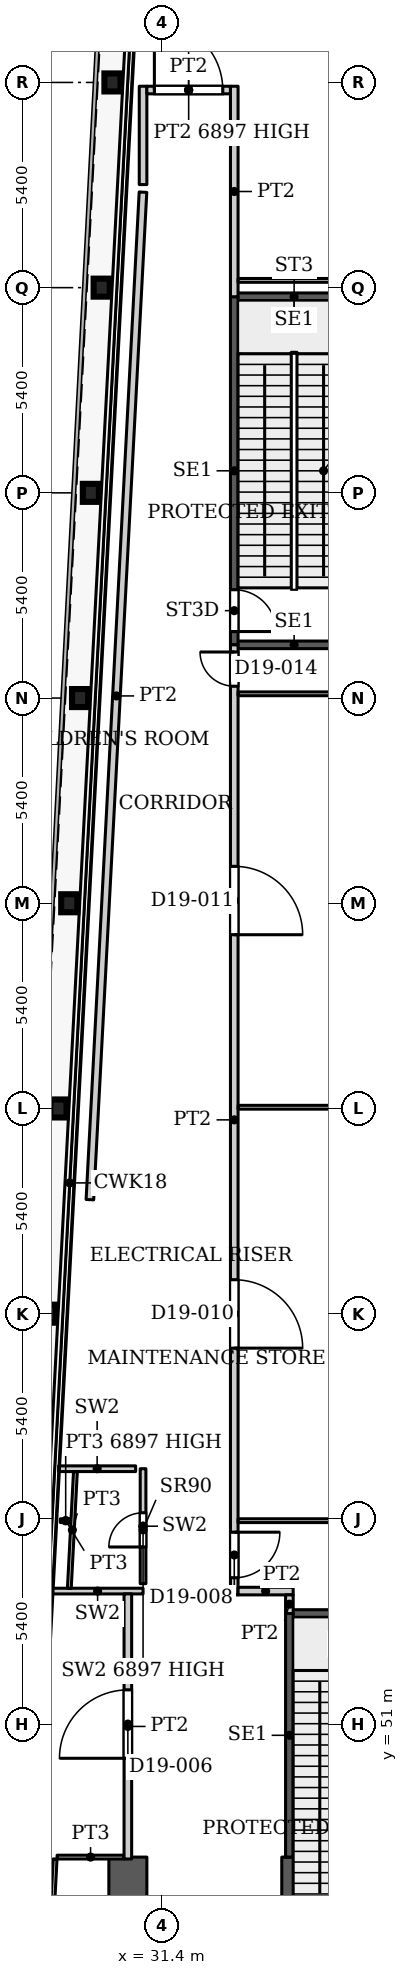
"""IFC4 building model, lengths in metres.
Left out: names, types, materials, properties, quantities, classifications, styles, units other than length and angle.
Written with IfcOpenShell. Run it as: python <this file> out.ifc"""

import sys

from ifc_helpers import new_model, si_unit, direction, frame, frame_2d, origin, origin_2d, place, context, subcontext, project, spatial, rectangle, i_section, extrude, source, transform, mapped, element, fill, save


model = new_model("IFC4")
c1 = context("Model", 3, precision=1e-05, world=origin(), true_north=direction((0.0, 1.0)))
c2 = subcontext(c1, "Body", "Model", "MODEL_VIEW")
j1 = project(units=[si_unit("LENGTHUNIT", "METRE"), si_unit("PLANEANGLEUNIT", "RADIAN")], contexts=[c1])
p1 = place(None, origin())
s1 = spatial("IfcSite", under=j1, at=p1, CompositionType="ELEMENT")
p2 = place(p1, origin())
s2 = spatial("IfcBuilding", under=s1, at=p2, CompositionType="ELEMENT")
p3 = place(p2, frame((0.0, 0.0, 81.2)))
s3 = spatial("IfcBuildingStorey", under=s2, at=p3, CompositionType="ELEMENT", Elevation=81.2)
for number, where, z_axis, x_axis in (
    (1, (28.39, 61.8, 0.0), (0.0, 0.0, 1.0), (1.0, 0.0, 0.0)),
    (2, (28.674, 67.2, 0.0), (0.0, 0.0, 1.0), (1.0, 0.0, 0.0)),
    (3, (28.958, 72.6, 0.0), (0.0, 0.0, 1.0), (1.0, 0.0, 0.0)),
    (4, (29.243, 78.0, 0.0), (0.0, 0.0, 1.0), (1.0, 0.0, 0.0)),
    (5, (29.527, 83.4, 0.0), (0.0, 0.0, 1.0), (1.0, 0.0, 0.0)),
    (6, (29.811, 88.8, 0.0), (0.0, 0.0, 1.0), (1.0, 0.0, 0.0)),
    (7, (30.095, 94.2, 0.0), (0.0, 0.0, 1.0), (1.0, 0.0, 0.0)),
):
    element("IfcColumn", number, at=place(p3, frame(where, z_axis=z_axis, x_axis=x_axis)), inside=s3, PredefinedType="COLUMN", context=c2, shape_type="SweptSolid", body=[
        extrude(i_section(OverallWidth=0.424, OverallDepth=0.474, WebThickness=0.048, FlangeThickness=0.077, FilletRadius=0.014, at=origin_2d()), origin(), (0.0, 0.0, 1.0), 7.8),
    ])
p4 = place(p3, frame((34.75, 29.05, 0.0), z_axis=(0.0, 0.0, 1.0), x_axis=(0.0, 1.0, 0.0)))
e8 = element("IfcWall", 8, at=p4, inside=s3, PredefinedType="SHEAR", context=c2, shape_type="SweptSolid", body=[
    extrude(rectangle(XDim=18.45, YDim=0.4, at=frame_2d((9.225, 0.0))), origin(), (0.0, 0.0, 1.0), 7.8),
])
p5 = place(p4, frame((8.025, 0.0, 0.0)))
e9 = element("IfcOpeningElement", 9, at=p5, cuts=e8, PredefinedType="OPENING", context=c2, shape_type="SweptSolid", body=[
    extrude(rectangle(XDim=1.1, YDim=2.2, at=frame_2d((0.55, 1.1))), frame((0.0, 0.21, 0.0), z_axis=(0.0, -1.0, 0.0), x_axis=(1.0, 0.0, 0.0)), (0.0, 0.0, 1.0), 0.42),
])
p6 = place(p4, frame((10.875, 0.0, 0.0)))
e10 = element("IfcOpeningElement", 10, at=p6, cuts=e8, PredefinedType="OPENING", context=c2, shape_type="SweptSolid", body=[
    extrude(rectangle(XDim=1.1, YDim=2.2, at=frame_2d((0.55, 1.1))), frame((0.0, 0.21, 0.0), z_axis=(0.0, -1.0, 0.0), x_axis=(1.0, 0.0, 0.0)), (0.0, 0.0, 1.0), 0.42),
])
p7 = place(p4, frame((13.725, 0.0, 0.0)))
e11 = element("IfcOpeningElement", 11, at=p7, cuts=e8, PredefinedType="OPENING", context=c2, shape_type="SweptSolid", body=[
    extrude(rectangle(XDim=1.1, YDim=2.2, at=frame_2d((0.55, 1.1))), frame((0.0, 0.21, 0.0), z_axis=(0.0, -1.0, 0.0), x_axis=(1.0, 0.0, 0.0)), (0.0, 0.0, 1.0), 0.42),
])
p8 = place(p4, frame((15.95, 0.0, 0.0)))
e12 = element("IfcOpeningElement", 12, at=p8, cuts=e8, PredefinedType="OPENING", context=c2, shape_type="SweptSolid", body=[
    extrude(rectangle(XDim=1.1, YDim=2.2, at=frame_2d((0.55, 1.1))), frame((0.0, 0.21, 0.0), z_axis=(0.0, -1.0, 0.0), x_axis=(1.0, 0.0, 0.0)), (0.0, 0.0, 1.0), 0.42),
])
p9 = place(p3, frame((30.5, 29.05, 0.0), z_axis=(0.0, 0.0, 1.0), x_axis=(0.0, 1.0, 0.0)))
e13 = element("IfcWall", 13, at=p9, inside=s3, PredefinedType="SHEAR", context=c2, shape_type="SweptSolid", body=[
    extrude(rectangle(XDim=18.45, YDim=1.0, at=frame_2d((9.225, 0.0))), origin(), (0.0, 0.0, 1.0), 7.8),
])
p10 = place(p9, frame((1.5, 0.0, 0.0)))
e14 = element("IfcOpeningElement", 14, at=p10, cuts=e13, PredefinedType="OPENING", context=c2, shape_type="SweptSolid", body=[
    extrude(rectangle(XDim=0.9, YDim=2.2, at=frame_2d((0.45, 1.1))), frame((0.0, 0.51, 0.0), z_axis=(0.0, -1.0, 0.0), x_axis=(1.0, 0.0, 0.0)), (0.0, 0.0, 1.0), 1.02),
])
p11 = place(p9, frame((8.146, 0.0, 0.0)))
e15 = element("IfcOpeningElement", 15, at=p11, cuts=e13, PredefinedType="OPENING", context=c2, shape_type="SweptSolid", body=[
    extrude(rectangle(XDim=0.9, YDim=2.2, at=frame_2d((0.45, 1.1))), frame((0.0, 0.51, 0.0), z_axis=(0.0, -1.0, 0.0), x_axis=(1.0, 0.0, 0.0)), (0.0, 0.0, 1.0), 1.02),
])
p12 = place(p3, frame((34.75, 53.91, 0.0), z_axis=(0.0, 0.0, 1.0), x_axis=(1.0, 0.0, 0.0)))
e16 = element("IfcWall", 16, at=p12, inside=s3, PredefinedType="SHEAR", context=c2, shape_type="SweptSolid", body=[
    extrude(rectangle(XDim=3.15, YDim=0.2, at=frame_2d((1.575, 0.0))), origin(), (0.0, 0.0, 1.0), 7.8),
])
p13 = place(p3, frame((34.75, 47.5, 0.0), z_axis=(0.0, 0.0, 1.0), x_axis=(0.0, 1.0, 0.0)))
e17 = element("IfcWall", 17, at=p13, inside=s3, PredefinedType="SHEAR", context=c2, shape_type="SweptSolid", body=[
    extrude(rectangle(XDim=6.41, YDim=0.2, at=frame_2d((3.205, 0.0))), origin(), (0.0, 0.0, 1.0), 7.8),
])
for number, where, z_axis, x_axis in (
    (18, (33.3, 79.4, 0.0), (0.0, 0.0, 1.0), (1.0, 0.0, 0.0)),
    (19, (33.3, 88.56, 0.0), (0.0, 0.0, 1.0), (1.0, 0.0, 0.0)),
):
    element("IfcWall", number, at=place(p3, frame(where, z_axis=z_axis, x_axis=x_axis)), inside=s3, PredefinedType="SHEAR", context=c2, shape_type="SweptSolid", body=[
        extrude(rectangle(XDim=3.15, YDim=0.2, at=frame_2d((1.575, 0.0))), origin(), (0.0, 0.0, 1.0), 7.8),
    ])
p14 = place(p3, frame((33.3, 79.4, 0.0), z_axis=(0.0, 0.0, 1.0), x_axis=(0.0, 1.0, 0.0)))
e20 = element("IfcWall", 20, at=p14, inside=s3, PredefinedType="SHEAR", context=c2, shape_type="SweptSolid", body=[
    extrude(rectangle(XDim=9.16, YDim=0.2, at=frame_2d((4.58, 0.0))), origin(), (0.0, 0.0, 1.0), 7.8),
])
p15 = place(p14, frame((0.35, 0.0, 0.0)))
e21 = element("IfcOpeningElement", 21, at=p15, cuts=e20, PredefinedType="OPENING", context=c2, shape_type="SweptSolid", body=[
    extrude(rectangle(XDim=1.1, YDim=2.2, at=frame_2d((0.55, 1.1))), frame((0.0, 0.11, 0.0), z_axis=(0.0, -1.0, 0.0), x_axis=(1.0, 0.0, 0.0)), (0.0, 0.0, 1.0), 0.22),
])
p16 = place(p3, frame((28.508, 54.5, 0.0), z_axis=(0.0, 0.0, 1.0), x_axis=(1.0, 0.0, 0.0)))
e22 = element("IfcWall", 22, at=p16, inside=s3, PredefinedType="PARTITIONING", context=c2, shape_type="SweptSolid", body=[
    extrude(rectangle(XDim=2.392, YDim=0.15, at=frame_2d((1.196, 0.0))), origin(), (0.0, 0.0, 1.0), 7.8),
])
p17 = place(p3, frame((30.9, 54.695, 0.0), z_axis=(0.0, 0.0, 1.0), x_axis=(0.0, 1.0, 0.0)))
e23 = element("IfcWall", 23, at=p17, inside=s3, PredefinedType="PARTITIONING", context=c2, shape_type="SweptSolid", body=[
    extrude(rectangle(XDim=3.025, YDim=0.15, at=frame_2d((1.512, 0.0))), origin(), (0.0, 0.0, 1.0), 6.897),
])
p18 = place(p17, frame((0.965, 0.0, 0.0)))
e24 = element("IfcOpeningElement", 24, at=p18, cuts=e23, PredefinedType="OPENING", context=c2, shape_type="SweptSolid", body=[
    extrude(rectangle(XDim=0.9, YDim=2.2, at=frame_2d((0.45, 1.1))), frame((0.0, 0.085, 0.0), z_axis=(0.0, -1.0, 0.0), x_axis=(1.0, 0.0, 0.0)), (0.0, 0.0, 1.0), 0.17),
])
p19 = place(p3, frame((28.678, 57.72, 0.0), z_axis=(0.0, 0.0, 1.0), x_axis=(1.0, 0.0, 0.0)))
e25 = element("IfcWall", 25, at=p19, inside=s3, PredefinedType="PARTITIONING", context=c2, shape_type="SweptSolid", body=[
    extrude(rectangle(XDim=2.027, YDim=0.15, at=frame_2d((1.014, 0.0))), origin(), (0.0, 0.0, 1.0), 7.8),
])
p20 = place(p3, frame((28.264, 41.32, 0.0), z_axis=(0.0, 0.0, 1.0), x_axis=(0.052460718565, 0.998622988423, 0.0)))
e26 = element("IfcWall", 26, at=p20, inside=s3, PredefinedType="PARTITIONING", context=c2, shape_type="SweptSolid", body=[
    extrude(rectangle(XDim=6.138, YDim=0.1, at=frame_2d((3.069, 0.0))), origin(), (0.0, 0.0, 1.0), 7.5),
])
p21 = place(p3, frame((28.638, 47.5, 0.0), z_axis=(0.0, 0.0, 1.0), x_axis=(1.0, 0.0, 0.0)))
e27 = element("IfcWall", 27, at=p21, inside=s3, PredefinedType="PARTITIONING", context=c2, shape_type="SweptSolid", body=[
    extrude(rectangle(XDim=1.762, YDim=0.1, at=frame_2d((0.881, 0.0))), origin(), (0.0, 0.0, 1.0), 7.5),
])
p22 = place(p3, frame((28.724, 56.353, 0.0), z_axis=(0.0, 0.0, 1.0), x_axis=(1.0, 0.0, 0.0)))
e28 = element("IfcWall", 28, at=p22, inside=s3, PredefinedType="PARTITIONING", context=c2, shape_type="SweptSolid", body=[
    extrude(rectangle(XDim=0.28, YDim=0.1, at=frame_2d((0.14, 0.0))), origin(), (0.0, 0.0, 1.0), 6.897),
])
p23 = place(p3, frame((28.96, 54.574, 0.0), z_axis=(0.0, 0.0, 1.0), x_axis=(0.052145785312, 0.998639483034, 0.0)))
e29 = element("IfcWall", 29, at=p23, inside=s3, PredefinedType="PARTITIONING", context=c2, shape_type="SweptSolid", body=[
    extrude(rectangle(XDim=3.071, YDim=0.1, at=frame_2d((1.536, 0.0))), origin(), (0.0, 0.0, 1.0), 7.5),
])
p24 = place(p3, frame((29.501, 64.8, 0.0), z_axis=(0.0, 0.0, 1.0), x_axis=(0.052619165502, 0.998614652117, 0.0)))
e30 = element("IfcWall", 30, at=p24, inside=s3, PredefinedType="PARTITIONING", context=c2, shape_type="SweptSolid", body=[
    extrude(rectangle(XDim=26.549, YDim=0.2, at=frame_2d((13.274, 0.0))), origin(), (0.0, 0.0, 1.0), 7.5),
])
p25 = place(p3, frame((30.5, 47.45, 0.0), z_axis=(0.0, 0.0, 1.0), x_axis=(0.0, 1.0, 0.0)))
e31 = element("IfcWall", 31, at=p25, inside=s3, PredefinedType="PARTITIONING", context=c2, shape_type="SweptSolid", body=[
    extrude(rectangle(XDim=6.976, YDim=0.2, at=frame_2d((3.488, 0.0))), origin(), (0.0, 0.0, 1.0), 7.5),
])
p26 = place(p25, frame((2.65, 0.0, 0.0)))
e32 = element("IfcOpeningElement", 32, at=p26, cuts=e31, PredefinedType="OPENING", context=c2, shape_type="SweptSolid", body=[
    extrude(rectangle(XDim=1.8, YDim=2.1, at=frame_2d((0.9, 1.05))), frame((0.0, 0.11, 0.0), z_axis=(0.0, -1.0, 0.0), x_axis=(1.0, 0.0, 0.0)), (0.0, 0.0, 1.0), 0.22),
])
p27 = place(p3, frame((30.9, 91.512, 0.0), z_axis=(0.0, 0.0, 1.0), x_axis=(0.0, 1.0, 0.0)))
e33 = element("IfcWall", 33, at=p27, inside=s3, PredefinedType="PARTITIONING", context=c2, shape_type="SweptSolid", body=[
    extrude(rectangle(XDim=2.588, YDim=0.2, at=frame_2d((1.294, 0.0))), origin(), (0.0, 0.0, 1.0), 7.5),
])
p28 = place(p3, frame((31.0, 94.0, 0.0), z_axis=(0.0, 0.0, 1.0), x_axis=(1.0, 0.0, 0.0)))
e34 = element("IfcWall", 34, at=p28, inside=s3, PredefinedType="PARTITIONING", context=c2, shape_type="SweptSolid", body=[
    extrude(rectangle(XDim=2.2, YDim=0.2, at=frame_2d((1.1, 0.0))), origin(), (0.0, 0.0, 1.0), 6.897),
])
p29 = place(p28, frame((0.198, 0.0, 0.0)))
e35 = element("IfcOpeningElement", 35, at=p29, cuts=e34, PredefinedType="OPENING", context=c2, shape_type="SweptSolid", body=[
    extrude(rectangle(XDim=1.8, YDim=2.1, at=frame_2d((0.9, 1.05))), frame((0.0, 0.11, 0.0), z_axis=(0.0, -1.0, 0.0), x_axis=(1.0, 0.0, 0.0)), (0.0, 0.0, 1.0), 0.22),
])
p30 = place(p3, frame((33.3, 54.4, 0.0), z_axis=(0.0, 0.0, 1.0), x_axis=(0.0, 1.0, 0.0)))
e36 = element("IfcWall", 36, at=p30, inside=s3, PredefinedType="PARTITIONING", context=c2, shape_type="SweptSolid", body=[
    extrude(rectangle(XDim=25.0, YDim=0.2, at=frame_2d((12.5, 0.0))), origin(), (0.0, 0.0, 1.0), 7.5),
])
p31 = place(p30, frame((0.45, 0.0, 0.0)))
e37 = element("IfcOpeningElement", 37, at=p31, cuts=e36, PredefinedType="OPENING", context=c2, shape_type="SweptSolid", body=[
    extrude(rectangle(XDim=1.2, YDim=2.1, at=frame_2d((0.6, 1.05))), frame((0.0, 0.11, 0.0), z_axis=(0.0, -1.0, 0.0), x_axis=(1.0, 0.0, 0.0)), (0.0, 0.0, 1.0), 0.22),
])
p32 = place(p30, frame((6.493, 0.0, 0.0)))
e38 = element("IfcOpeningElement", 38, at=p32, cuts=e36, PredefinedType="OPENING", context=c2, shape_type="SweptSolid", body=[
    extrude(rectangle(XDim=1.8, YDim=2.1, at=frame_2d((0.9, 1.05))), frame((0.0, 0.11, 0.0), z_axis=(0.0, -1.0, 0.0), x_axis=(1.0, 0.0, 0.0)), (0.0, 0.0, 1.0), 0.22),
])
p33 = place(p30, frame((17.372, 0.0, 0.0)))
e39 = element("IfcOpeningElement", 39, at=p33, cuts=e36, PredefinedType="OPENING", context=c2, shape_type="SweptSolid", body=[
    extrude(rectangle(XDim=1.8, YDim=2.1, at=frame_2d((0.9, 1.05))), frame((0.0, 0.11, 0.0), z_axis=(0.0, -1.0, 0.0), x_axis=(1.0, 0.0, 0.0)), (0.0, 0.0, 1.0), 0.22),
])
p34 = place(p30, frame((23.912, 0.0, 0.0)))
e40 = element("IfcOpeningElement", 40, at=p34, cuts=e36, PredefinedType="OPENING", context=c2, shape_type="SweptSolid", body=[
    extrude(rectangle(XDim=0.9, YDim=2.1, at=frame_2d((0.45, 1.05))), frame((0.0, 0.11, 0.0), z_axis=(0.0, -1.0, 0.0), x_axis=(1.0, 0.0, 0.0)), (0.0, 0.0, 1.0), 0.22),
])
p35 = place(p3, frame((33.3, 88.56, 0.0), z_axis=(0.0, 0.0, 1.0), x_axis=(0.0, 1.0, 0.0)))
e41 = element("IfcWall", 41, at=p35, inside=s3, PredefinedType="PARTITIONING", context=c2, shape_type="SweptSolid", body=[
    extrude(rectangle(XDim=5.54, YDim=0.2, at=frame_2d((2.77, 0.0))), origin(), (0.0, 0.0, 1.0), 7.5),
])
p36 = place(p3, frame((33.4, 54.5, 0.0), z_axis=(0.0, 0.0, 1.0), x_axis=(1.0, 0.0, 0.0)))
e42 = element("IfcWall", 42, at=p36, inside=s3, PredefinedType="PARTITIONING", context=c2, shape_type="SweptSolid", body=[
    extrude(rectangle(XDim=1.45, YDim=0.2, at=frame_2d((0.725, 0.0))), origin(), (0.0, 0.0, 1.0), 7.5),
])
p37 = place(p3, frame((33.4, 56.353, 0.0), z_axis=(0.0, 0.0, 1.0), x_axis=(1.0, 0.0, 0.0)))
e43 = element("IfcWall", 43, at=p37, inside=s3, PredefinedType="PARTITIONING", context=c2, shape_type="SweptSolid", body=[
    extrude(rectangle(XDim=13.77, YDim=0.1, at=frame_2d((6.885, 0.0))), origin(), (0.0, 0.0, 1.0), 6.897),
])
p38 = place(p37, frame((5.55, 0.0, 0.0)))
e44 = element("IfcOpeningElement", 44, at=p38, cuts=e43, PredefinedType="OPENING", context=c2, shape_type="SweptSolid", body=[
    extrude(rectangle(XDim=1.0, YDim=2.1, at=frame_2d((0.5, 1.05))), frame((0.0, 0.06, 0.0), z_axis=(0.0, -1.0, 0.0), x_axis=(1.0, 0.0, 0.0)), (0.0, 0.0, 1.0), 0.12),
])
p39 = place(p3, frame((33.4, 67.232, 0.0), z_axis=(0.0, 0.0, 1.0), x_axis=(1.0, 0.0, 0.0)))
e45 = element("IfcWall", 45, at=p39, inside=s3, PredefinedType="PARTITIONING", context=c2, shape_type="SweptSolid", body=[
    extrude(rectangle(XDim=13.77, YDim=0.1, at=frame_2d((6.885, 0.0))), origin(), (0.0, 0.0, 1.0), 6.897),
])
p40 = place(p3, frame((33.4, 78.112, 0.0), z_axis=(0.0, 0.0, 1.0), x_axis=(1.0, 0.0, 0.0)))
e46 = element("IfcWall", 46, at=p40, inside=s3, PredefinedType="PARTITIONING", context=c2, shape_type="SweptSolid", body=[
    extrude(rectangle(XDim=13.77, YDim=0.1, at=frame_2d((6.885, 0.0))), origin(), (0.0, 0.0, 1.0), 6.897),
])
p41 = place(p40, frame((5.73, 0.0, 0.0)))
e47 = element("IfcOpeningElement", 47, at=p41, cuts=e46, PredefinedType="OPENING", context=c2, shape_type="SweptSolid", body=[
    extrude(rectangle(XDim=1.0, YDim=2.1, at=frame_2d((0.5, 1.05))), frame((0.0, 0.06, 0.0), z_axis=(0.0, -1.0, 0.0), x_axis=(1.0, 0.0, 0.0)), (0.0, 0.0, 1.0), 0.12),
])
p42 = place(p3, frame((33.4, 88.991, 0.0), z_axis=(0.0, 0.0, 1.0), x_axis=(1.0, 0.0, 0.0)))
e48 = element("IfcWall", 48, at=p42, inside=s3, PredefinedType="PARTITIONING", context=c2, shape_type="SweptSolid", body=[
    extrude(rectangle(XDim=13.77, YDim=0.1, at=frame_2d((6.885, 0.0))), origin(), (0.0, 0.0, 1.0), 6.897),
])
p43 = place(p3, frame((34.75, 53.91, 0.0), z_axis=(0.0, 0.0, 1.0), x_axis=(0.0, 1.0, 0.0)))
e49 = element("IfcWall", 49, at=p43, inside=s3, PredefinedType="PARTITIONING", context=c2, shape_type="SweptSolid", body=[
    extrude(rectangle(XDim=0.49, YDim=0.2, at=frame_2d((0.245, 0.0))), origin(), (0.0, 0.0, 1.0), 7.5),
])
m1 = source(origin(), c2, "Body", "SweptSolid", [
    extrude(rectangle(XDim=0.9, YDim=2.2, at=frame_2d((0.45, 1.1))), frame((0.0, 0.025, 0.0), z_axis=(0.0, -1.0, 0.0), x_axis=(1.0, 0.0, 0.0)), (0.0, 0.0, 1.0), 0.05),
])
p44 = place(p18, origin())
e50 = element("IfcDoor", 50, at=p44, inside=s3, OperationType="SINGLE_SWING_LEFT", PredefinedType="DOOR", context=c2, shape_type="MappedRepresentation", body=[
    mapped(m1, transform((0.0, 0.0, 0.0), x_axis=(1.0, 0.0, 0.0), y_axis=(0.0, 1.0, 0.0), z_axis=(0.0, 0.0, 1.0), scale=1.0)),
])
fill(e24, e50)
m2 = source(origin(), c2, "Body", "SweptSolid", [
    extrude(rectangle(XDim=1.1, YDim=2.2, at=frame_2d((0.55, 1.1))), frame((0.0, 0.025, 0.0), z_axis=(0.0, -1.0, 0.0), x_axis=(1.0, 0.0, 0.0)), (0.0, 0.0, 1.0), 0.05),
])
p45 = place(p15, origin())
e51 = element("IfcDoor", 51, at=p45, inside=s3, OperationType="SINGLE_SWING_RIGHT", PredefinedType="DOOR", context=c2, shape_type="MappedRepresentation", body=[
    mapped(m2, transform((0.0, 0.0, 0.0), x_axis=(1.0, 0.0, 0.0), y_axis=(0.0, 1.0, 0.0), z_axis=(0.0, 0.0, 1.0), scale=1.0)),
])
fill(e21, e51)
m3 = source(origin(), c2, "Body", "SweptSolid", [
    extrude(rectangle(XDim=1.8, YDim=2.1, at=frame_2d((0.9, 1.05))), frame((0.0, 0.025, 0.0), z_axis=(0.0, -1.0, 0.0), x_axis=(1.0, 0.0, 0.0)), (0.0, 0.0, 1.0), 0.05),
])
p46 = place(p26, origin())
e52 = element("IfcDoor", 52, at=p46, inside=s3, OperationType="DOUBLE_DOOR_SINGLE_SWING", PredefinedType="DOOR", context=c2, shape_type="MappedRepresentation", body=[
    mapped(m3, transform((0.0, 0.0, 0.0), x_axis=(1.0, 0.0, 0.0), y_axis=(0.0, 1.0, 0.0), z_axis=(0.0, 0.0, 1.0), scale=1.0)),
])
fill(e32, e52)
m4 = source(origin(), c2, "Body", "SweptSolid", [
    extrude(rectangle(XDim=1.2, YDim=2.1, at=frame_2d((0.6, 1.05))), frame((0.0, 0.025, 0.0), z_axis=(0.0, -1.0, 0.0), x_axis=(1.0, 0.0, 0.0)), (0.0, 0.0, 1.0), 0.05),
])
p47 = place(p31, origin())
e53 = element("IfcDoor", 53, at=p47, inside=s3, OperationType="SINGLE_SWING_RIGHT", PredefinedType="DOOR", context=c2, shape_type="MappedRepresentation", body=[
    mapped(m4, transform((0.0, 0.0, 0.0), x_axis=(1.0, 0.0, 0.0), y_axis=(0.0, 1.0, 0.0), z_axis=(0.0, 0.0, 1.0), scale=1.0)),
])
fill(e37, e53)
p48 = place(p32, origin())
e54 = element("IfcDoor", 54, at=p48, inside=s3, OperationType="DOUBLE_DOOR_SINGLE_SWING", PredefinedType="DOOR", context=c2, shape_type="MappedRepresentation", body=[
    mapped(m3, transform((0.0, 0.0, 0.0), x_axis=(1.0, 0.0, 0.0), y_axis=(0.0, 1.0, 0.0), z_axis=(0.0, 0.0, 1.0), scale=1.0)),
])
fill(e38, e54)
p49 = place(p33, origin())
e55 = element("IfcDoor", 55, at=p49, inside=s3, OperationType="DOUBLE_DOOR_SINGLE_SWING", PredefinedType="DOOR", context=c2, shape_type="MappedRepresentation", body=[
    mapped(m3, transform((0.0, 0.0, 0.0), x_axis=(1.0, 0.0, 0.0), y_axis=(0.0, 1.0, 0.0), z_axis=(0.0, 0.0, 1.0), scale=1.0)),
])
fill(e39, e55)
p50 = place(p29, origin())
e56 = element("IfcDoor", 56, at=p50, inside=s3, OperationType="DOUBLE_DOOR_SINGLE_SWING", PredefinedType="DOOR", context=c2, shape_type="MappedRepresentation", body=[
    mapped(m3, transform((0.0, 0.0, 0.0), x_axis=(1.0, 0.0, 0.0), y_axis=(0.0, 1.0, 0.0), z_axis=(0.0, 0.0, 1.0), scale=1.0)),
])
fill(e35, e56)
m5 = source(origin(), c2, "Body", "SweptSolid", [
    extrude(rectangle(XDim=0.9, YDim=2.1, at=frame_2d((0.45, 1.05))), frame((0.0, 0.025, 0.0), z_axis=(0.0, -1.0, 0.0), x_axis=(1.0, 0.0, 0.0)), (0.0, 0.0, 1.0), 0.05),
])
p51 = place(p34, origin())
e57 = element("IfcDoor", 57, at=p51, inside=s3, OperationType="SINGLE_SWING_LEFT", PredefinedType="DOOR", context=c2, shape_type="MappedRepresentation", body=[
    mapped(m5, transform((0.0, 0.0, 0.0), x_axis=(1.0, 0.0, 0.0), y_axis=(0.0, 1.0, 0.0), z_axis=(0.0, 0.0, 1.0), scale=1.0)),
])
fill(e40, e57)
save(model, sys.argv[1])
